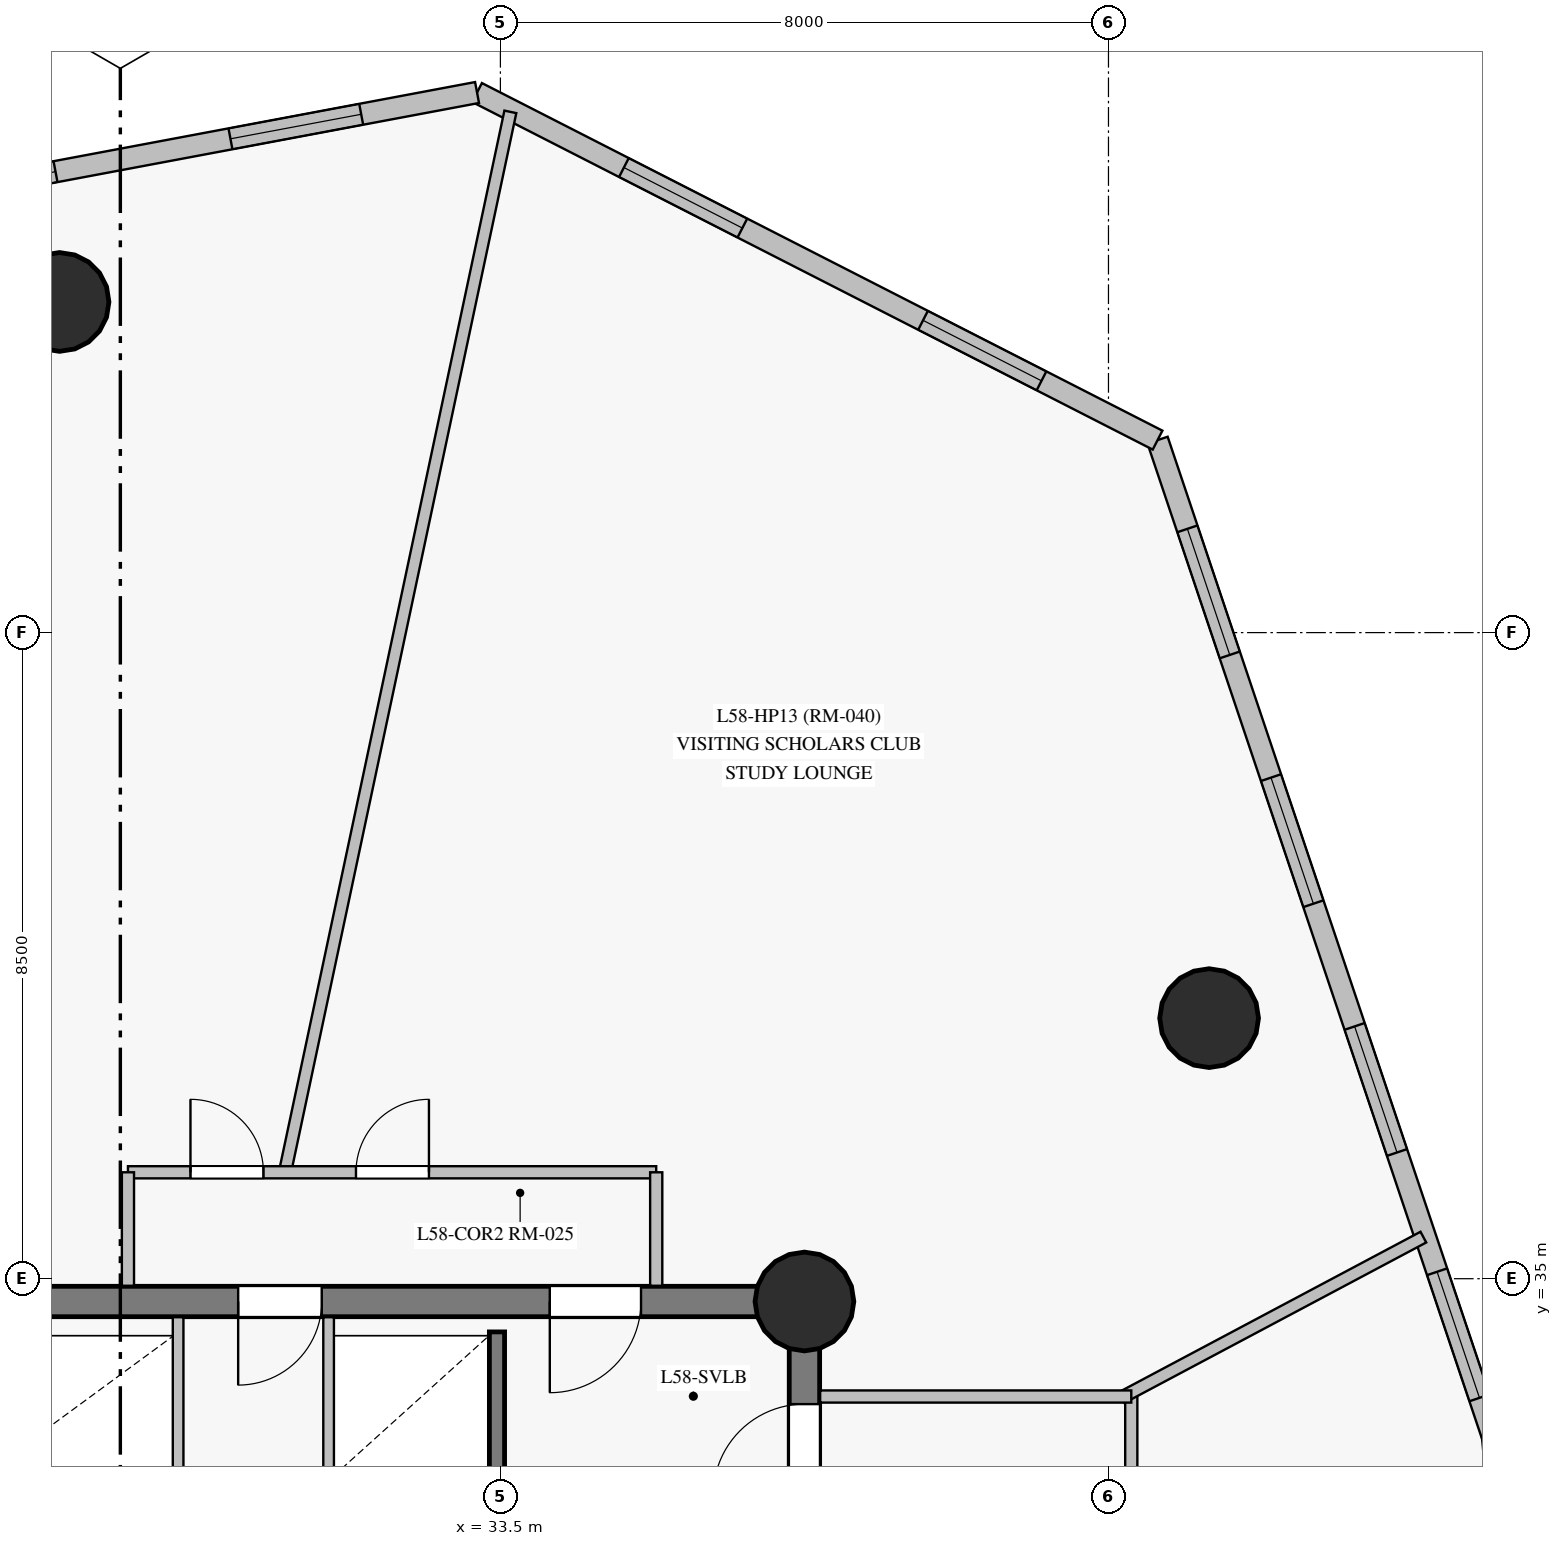
"""IFC4 building model, lengths in metres.
Left out: names, types, materials, properties, quantities, classifications, styles, units other than length and angle.
Written with IfcOpenShell. Run it as: python <this file> out.ifc"""

import sys

from ifc_helpers import new_model, si_unit, direction, frame, frame_2d, origin, origin_with_axes, origin_2d, place, context, subcontext, project, spatial, rectangle, circle, extrude, source, transform, mapped, element, fill, save


model = new_model("IFC4")
c1 = context("Model", 3, precision=1e-05, world=origin(), true_north=direction((0.0, 1.0)))
c2 = subcontext(c1, "Body", "Model", "MODEL_VIEW")
j1 = project(units=[si_unit("LENGTHUNIT", "METRE"), si_unit("PLANEANGLEUNIT", "RADIAN")], contexts=[c1])
p1 = place(None, origin())
s1 = spatial("IfcSite", under=j1, at=p1, CompositionType="ELEMENT")
p2 = place(p1, origin())
s2 = spatial("IfcBuilding", under=s1, at=p2, CompositionType="ELEMENT")
p3 = place(p2, frame((0.0, 0.0, 199.25)))
s3 = spatial("IfcBuildingStorey", under=s2, at=p3, CompositionType="ELEMENT", Elevation=199.25)
p4 = place(p3, frame((37.5, 18.3, 0.0), z_axis=(0.0, 0.0, 1.0), x_axis=(0.0, 1.0, 0.0)))
e1 = element("IfcWall", 1, at=p4, inside=s3, PredefinedType="SHEAR", context=c2, shape_type="SweptSolid", body=[
    extrude(rectangle(XDim=16.4, YDim=0.4, at=frame_2d((8.2, 0.0))), origin(), (0.0, 0.0, 1.0), 2.825),
])
p5 = place(p4, frame((13.85, 0.0, 0.0)))
e2 = element("IfcOpeningElement", 2, at=p5, cuts=e1, PredefinedType="OPENING", context=c2, shape_type="SweptSolid", body=[
    extrude(rectangle(XDim=1.2, YDim=2.15, at=frame_2d((0.6, 1.075))), frame((0.0, 0.21, 0.0), z_axis=(0.0, -1.0, 0.0), x_axis=(1.0, 0.0, 0.0)), (0.0, 0.0, 1.0), 0.42),
])
p6 = place(p3, frame((37.5, 34.7, 0.0), z_axis=(0.0, 0.0, 1.0), x_axis=(-1.0, 0.0, 0.0)))
e3 = element("IfcWall", 3, at=p6, inside=s3, PredefinedType="SHEAR", context=c2, shape_type="SweptSolid", body=[
    extrude(rectangle(XDim=10.95, YDim=0.4, at=frame_2d((5.475, 0.0))), origin(), (0.0, 0.0, 1.0), 2.825),
])
p7 = place(p6, frame((2.15, 0.0, 0.0)))
e4 = element("IfcOpeningElement", 4, at=p7, cuts=e3, PredefinedType="OPENING", context=c2, shape_type="SweptSolid", body=[
    extrude(rectangle(XDim=1.2, YDim=2.15, at=frame_2d((0.6, 1.075))), frame((0.0, 0.21, 0.0), z_axis=(0.0, -1.0, 0.0), x_axis=(1.0, 0.0, 0.0)), (0.0, 0.0, 1.0), 0.42),
])
p8 = place(p6, frame((6.35, 0.0, 0.0)))
e5 = element("IfcOpeningElement", 5, at=p8, cuts=e3, PredefinedType="OPENING", context=c2, shape_type="SweptSolid", body=[
    extrude(rectangle(XDim=1.1, YDim=2.15, at=frame_2d((0.55, 1.075))), frame((0.0, 0.21, 0.0), z_axis=(0.0, -1.0, 0.0), x_axis=(1.0, 0.0, 0.0)), (0.0, 0.0, 1.0), 0.42),
])
m1 = source(origin_with_axes(), c2, "Body", "SweptSolid", [
    extrude(circle(Radius=0.65, at=origin_2d()), origin(), (0.0, 0.0, 1.0), 3.05),
])
for number, where, z_axis, x_axis in (
    (6, (37.5, 34.7, 0.0), (0.0, 0.0, 1.0), (1.0, 0.0, 0.0)),
    (7, (42.824, 38.428, 0.0), (0.0, 0.0, 1.0), (1.0, 0.0, 0.0)),
    (8, (27.7, 47.85, 0.0), (0.0, 0.0, 1.0), (1.0, 0.0, 0.0)),
):
    element("IfcColumn", number, at=place(p3, frame(where, z_axis=z_axis, x_axis=x_axis)), inside=s3, PredefinedType="COLUMN", context=c2, shape_type="MappedRepresentation", body=[
        mapped(m1, transform((0.0, 0.0, 0.0), scale=1.0)),
    ])
p9 = place(p3, frame((46.554, 32.917, 0.0), z_axis=(0.0, 0.0, 1.0), x_axis=(-0.318603463381, 0.947888091033, 0.0)))
e9 = element("IfcWall", 9, at=p9, inside=s3, PredefinedType="SOLIDWALL", context=c2, shape_type="SweptSolid", body=[
    extrude(rectangle(XDim=13.837, YDim=0.28, at=frame_2d((6.918, 0.0))), origin(), (0.0, 0.0, 1.0), 2.825),
])
p10 = place(p9, frame((0.544, 0.0, 0.85)))
e10 = element("IfcOpeningElement", 10, at=p10, cuts=e9, PredefinedType="OPENING", context=c2, shape_type="SweptSolid", body=[
    extrude(rectangle(XDim=1.75, YDim=1.65, at=frame_2d((0.875, 0.825))), frame((0.0, 0.15, 0.0), z_axis=(0.0, -1.0, 0.0), x_axis=(1.0, 0.0, 0.0)), (0.0, 0.0, 1.0), 0.3),
])
p11 = place(p9, frame((3.949, 0.0, 0.85)))
e11 = element("IfcOpeningElement", 11, at=p11, cuts=e9, PredefinedType="OPENING", context=c2, shape_type="SweptSolid", body=[
    extrude(rectangle(XDim=1.75, YDim=1.65, at=frame_2d((0.875, 0.825))), frame((0.0, 0.15, 0.0), z_axis=(0.0, -1.0, 0.0), x_axis=(1.0, 0.0, 0.0)), (0.0, 0.0, 1.0), 0.3),
])
p12 = place(p9, frame((7.402, 0.0, 0.85)))
e12 = element("IfcOpeningElement", 12, at=p12, cuts=e9, PredefinedType="OPENING", context=c2, shape_type="SweptSolid", body=[
    extrude(rectangle(XDim=1.75, YDim=1.65, at=frame_2d((0.875, 0.825))), frame((0.0, 0.15, 0.0), z_axis=(0.0, -1.0, 0.0), x_axis=(1.0, 0.0, 0.0)), (0.0, 0.0, 1.0), 0.3),
])
p13 = place(p9, frame((10.855, 0.0, 0.85)))
e13 = element("IfcOpeningElement", 13, at=p13, cuts=e9, PredefinedType="OPENING", context=c2, shape_type="SweptSolid", body=[
    extrude(rectangle(XDim=1.75, YDim=1.65, at=frame_2d((0.875, 0.825))), frame((0.0, 0.15, 0.0), z_axis=(0.0, -1.0, 0.0), x_axis=(1.0, 0.0, 0.0)), (0.0, 0.0, 1.0), 0.3),
])
p14 = place(p3, frame((42.146, 46.032, 0.0), z_axis=(0.0, 0.0, 1.0), x_axis=(-0.890552311642, 0.454880841792, 0.0)))
e14 = element("IfcWall", 14, at=p14, inside=s3, PredefinedType="SOLIDWALL", context=c2, shape_type="SweptSolid", body=[
    extrude(rectangle(XDim=10.053, YDim=0.28, at=frame_2d((5.027, 0.0))), origin(), (0.0, 0.0, 1.0), 2.825),
])
p15 = place(p14, frame((1.715, 0.0, 0.85)))
e15 = element("IfcOpeningElement", 15, at=p15, cuts=e14, PredefinedType="OPENING", context=c2, shape_type="SweptSolid", body=[
    extrude(rectangle(XDim=1.75, YDim=1.65, at=frame_2d((0.875, 0.825))), frame((0.0, 0.15, 0.0), z_axis=(0.0, -1.0, 0.0), x_axis=(1.0, 0.0, 0.0)), (0.0, 0.0, 1.0), 0.3),
])
p16 = place(p14, frame((6.134, 0.0, 0.85)))
e16 = element("IfcOpeningElement", 16, at=p16, cuts=e14, PredefinedType="OPENING", context=c2, shape_type="SweptSolid", body=[
    extrude(rectangle(XDim=1.75, YDim=1.65, at=frame_2d((0.875, 0.825))), frame((0.0, 0.15, 0.0), z_axis=(0.0, -1.0, 0.0), x_axis=(1.0, 0.0, 0.0)), (0.0, 0.0, 1.0), 0.3),
])
p17 = place(p3, frame((33.193, 50.605, 0.0), z_axis=(0.0, 0.0, 1.0), x_axis=(-0.982828906214, -0.184519216099, 0.0)))
e17 = element("IfcWall", 17, at=p17, inside=s3, PredefinedType="SOLIDWALL", context=c2, shape_type="SweptSolid", body=[
    extrude(rectangle(XDim=13.035, YDim=0.28, at=frame_2d((6.518, 0.0))), origin(), (0.0, 0.0, 1.0), 2.825),
])
p18 = place(p17, frame((1.551, 0.0, 0.85)))
e18 = element("IfcOpeningElement", 18, at=p18, cuts=e17, PredefinedType="OPENING", context=c2, shape_type="SweptSolid", body=[
    extrude(rectangle(XDim=1.75, YDim=1.65, at=frame_2d((0.875, 0.825))), frame((0.0, 0.15, 0.0), z_axis=(0.0, -1.0, 0.0), x_axis=(1.0, 0.0, 0.0)), (0.0, 0.0, 1.0), 0.3),
])
p19 = place(p17, frame((5.643, 0.0, 0.85)))
e19 = element("IfcOpeningElement", 19, at=p19, cuts=e17, PredefinedType="OPENING", context=c2, shape_type="SweptSolid", body=[
    extrude(rectangle(XDim=1.75, YDim=1.65, at=frame_2d((0.875, 0.825))), frame((0.0, 0.15, 0.0), z_axis=(0.0, -1.0, 0.0), x_axis=(1.0, 0.0, 0.0)), (0.0, 0.0, 1.0), 0.3),
])
p20 = place(p17, frame((9.735, 0.0, 0.85)))
e20 = element("IfcOpeningElement", 20, at=p20, cuts=e17, PredefinedType="OPENING", context=c2, shape_type="SweptSolid", body=[
    extrude(rectangle(XDim=1.75, YDim=1.65, at=frame_2d((0.875, 0.825))), frame((0.0, 0.15, 0.0), z_axis=(0.0, -1.0, 0.0), x_axis=(1.0, 0.0, 0.0)), (0.0, 0.0, 1.0), 0.3),
])
p21 = place(p3, frame((33.455, 18.7, 0.0), z_axis=(0.0, 0.0, 1.0), x_axis=(0.0, 1.0, 0.0)))
e21 = element("IfcWall", 21, at=p21, inside=s3, PredefinedType="SHEAR", context=c2, shape_type="SweptSolid", body=[
    extrude(rectangle(XDim=15.6, YDim=0.2, at=frame_2d((7.8, 0.0))), origin(), (0.0, 0.0, 1.0), 2.825),
])
p22 = place(p21, frame((2.75, 0.0, 0.0)))
e22 = element("IfcOpeningElement", 22, at=p22, cuts=e21, PredefinedType="OPENING", context=c2, shape_type="SweptSolid", body=[
    extrude(rectangle(XDim=1.15, YDim=2.15, at=frame_2d((0.575, 1.075))), frame((0.0, 0.11, 0.0), z_axis=(0.0, -1.0, 0.0), x_axis=(1.0, 0.0, 0.0)), (0.0, 0.0, 1.0), 0.22),
])
p23 = place(p21, frame((0.55, 0.0, 0.0)))
e23 = element("IfcOpeningElement", 23, at=p23, cuts=e21, PredefinedType="OPENING", context=c2, shape_type="SweptSolid", body=[
    extrude(rectangle(XDim=0.94, YDim=2.1, at=frame_2d((0.47, 1.05))), frame((0.0, 0.11, 0.0), z_axis=(0.0, -1.0, 0.0), x_axis=(1.0, 0.0, 0.0)), (0.0, 0.0, 1.0), 0.22),
])
p24 = place(p3, frame((41.8, 33.45, 0.0), z_axis=(0.0, 0.0, 1.0), x_axis=(0.0, -1.0, 0.0)))
e24 = element("IfcWall", 24, at=p24, inside=s3, PredefinedType="PARTITIONING", context=c2, shape_type="SweptSolid", body=[
    extrude(rectangle(XDim=19.6, YDim=0.16, at=frame_2d((9.8, 0.0))), origin(), (0.0, 0.0, 1.0), 2.275),
])
p25 = place(p24, frame((10.475, 0.0, 0.0)))
e25 = element("IfcOpeningElement", 25, at=p25, cuts=e24, PredefinedType="OPENING", context=c2, shape_type="SweptSolid", body=[
    extrude(rectangle(XDim=0.96, YDim=2.15, at=frame_2d((0.48, 1.075))), frame((0.0, 0.09, 0.0), z_axis=(0.0, -1.0, 0.0), x_axis=(1.0, 0.0, 0.0)), (0.0, 0.0, 1.0), 0.18),
])
p26 = place(p24, frame((9.325, 0.0, 0.0)))
e26 = element("IfcOpeningElement", 26, at=p26, cuts=e24, PredefinedType="OPENING", context=c2, shape_type="SweptSolid", body=[
    extrude(rectangle(XDim=0.96, YDim=2.15, at=frame_2d((0.48, 1.075))), frame((0.0, 0.09, 0.0), z_axis=(0.0, -1.0, 0.0), x_axis=(1.0, 0.0, 0.0)), (0.0, 0.0, 1.0), 0.18),
])
p27 = place(p24, frame((4.425, 0.0, 0.0)))
e27 = element("IfcOpeningElement", 27, at=p27, cuts=e24, PredefinedType="OPENING", context=c2, shape_type="SweptSolid", body=[
    extrude(rectangle(XDim=0.96, YDim=2.15, at=frame_2d((0.48, 1.075))), frame((0.0, 0.09, 0.0), z_axis=(0.0, -1.0, 0.0), x_axis=(1.0, 0.0, 0.0)), (0.0, 0.0, 1.0), 0.18),
])
p28 = place(p3, frame((30.659, 36.371, 0.0), z_axis=(0.0, 0.0, 1.0), x_axis=(0.207917796802, 0.978146302847, 0.0)))
e28 = element("IfcWall", 28, at=p28, inside=s3, PredefinedType="PARTITIONING", context=c2, shape_type="SweptSolid", body=[
    extrude(rectangle(XDim=14.292, YDim=0.16, at=frame_2d((7.146, 0.0))), origin(), (0.0, 0.0, 1.0), 2.825),
])
p29 = place(p3, frame((28.6, 36.4, 0.0), z_axis=(0.0, 0.0, 1.0), x_axis=(1.0, 0.0, 0.0)))
e29 = element("IfcWall", 29, at=p29, inside=s3, PredefinedType="PARTITIONING", context=c2, shape_type="SweptSolid", body=[
    extrude(rectangle(XDim=6.95, YDim=0.16, at=frame_2d((3.475, 0.0))), origin(), (0.0, 0.0, 1.0), 2.375),
])
p30 = place(p29, frame((3.0, 0.0, 0.0)))
e30 = element("IfcOpeningElement", 30, at=p30, cuts=e29, PredefinedType="OPENING", context=c2, shape_type="SweptSolid", body=[
    extrude(rectangle(XDim=0.96, YDim=2.15, at=frame_2d((0.48, 1.075))), frame((0.0, 0.09, 0.0), z_axis=(0.0, -1.0, 0.0), x_axis=(1.0, 0.0, 0.0)), (0.0, 0.0, 1.0), 0.18),
])
p31 = place(p29, frame((0.823, 0.0, 0.0)))
e31 = element("IfcOpeningElement", 31, at=p31, cuts=e29, PredefinedType="OPENING", context=c2, shape_type="SweptSolid", body=[
    extrude(rectangle(XDim=0.96, YDim=2.15, at=frame_2d((0.48, 1.075))), frame((0.0, 0.09, 0.0), z_axis=(0.0, -1.0, 0.0), x_axis=(1.0, 0.0, 0.0)), (0.0, 0.0, 1.0), 0.18),
])
p32 = place(p3, frame((41.672, 33.436, 0.0), z_axis=(0.0, 0.0, 1.0), x_axis=(0.882929374505, 0.469505824923, 0.0)))
e32 = element("IfcWall", 32, at=p32, inside=s3, PredefinedType="PARTITIONING", context=c2, shape_type="SweptSolid", body=[
    extrude(rectangle(XDim=4.497, YDim=0.16, at=frame_2d((2.249, 0.0))), origin(), (0.0, 0.0, 1.0), 2.825),
])
p33 = place(p3, frame((37.707, 33.45, 0.0), z_axis=(0.0, 0.0, 1.0), x_axis=(1.0, 0.0, 0.0)))
e33 = element("IfcWall", 33, at=p33, inside=s3, PredefinedType="PARTITIONING", context=c2, shape_type="SweptSolid", body=[
    extrude(rectangle(XDim=4.093, YDim=0.16, at=frame_2d((2.046, 0.0))), origin(), (0.0, 0.0, 1.0), 2.825),
])
for number, where, z_axis, x_axis in (
    (34, (29.26, 30.45, 0.0), (0.0, 0.0, 1.0), (0.0, 1.0, 0.0)),
    (35, (31.24, 30.45, 0.0), (0.0, 0.0, 1.0), (0.0, 1.0, 0.0)),
):
    element("IfcWall", number, at=place(p3, frame(where, z_axis=z_axis, x_axis=x_axis)), inside=s3, PredefinedType="PARTITIONING", context=c2, shape_type="SweptSolid", body=[
        extrude(rectangle(XDim=4.043, YDim=0.14, at=frame_2d((2.021, 0.0))), origin(), (0.0, 0.0, 1.0), 2.825),
    ])
for number, where, z_axis, x_axis in (
    (36, (28.6, 34.907, 0.0), (0.0, 0.0, 1.0), (0.0, 1.0, 0.0)),
    (37, (35.55, 36.4, 0.0), (0.0, 0.0, 1.0), (0.0, -1.0, 0.0)),
):
    element("IfcWall", number, at=place(p3, frame(where, z_axis=z_axis, x_axis=x_axis)), inside=s3, PredefinedType="PARTITIONING", context=c2, shape_type="SweptSolid", body=[
        extrude(rectangle(XDim=1.493, YDim=0.16, at=frame_2d((0.747, 0.0))), origin(), (0.0, 0.0, 1.0), 2.825),
    ])
m2 = source(origin_with_axes(), c2, "Body", "SweptSolid", [
    extrude(rectangle(XDim=1.75, YDim=1.65, at=frame_2d((0.875, 0.825))), frame((0.0, 0.03, 0.0), z_axis=(0.0, -1.0, 0.0), x_axis=(1.0, 0.0, 0.0)), (0.0, 0.0, 1.0), 0.06),
])
p34 = place(p10, origin())
e38 = element("IfcWindow", 38, at=p34, inside=s3, PartitioningType="SINGLE_PANEL", PredefinedType="WINDOW", context=c2, shape_type="MappedRepresentation", body=[
    mapped(m2, transform((0.0, 0.0, 0.0), scale=1.0)),
])
fill(e10, e38)
p35 = place(p11, origin())
e39 = element("IfcWindow", 39, at=p35, inside=s3, PartitioningType="SINGLE_PANEL", PredefinedType="WINDOW", context=c2, shape_type="MappedRepresentation", body=[
    mapped(m2, transform((0.0, 0.0, 0.0), scale=1.0)),
])
fill(e11, e39)
p36 = place(p12, origin())
e40 = element("IfcWindow", 40, at=p36, inside=s3, PartitioningType="SINGLE_PANEL", PredefinedType="WINDOW", context=c2, shape_type="MappedRepresentation", body=[
    mapped(m2, transform((0.0, 0.0, 0.0), scale=1.0)),
])
fill(e12, e40)
p37 = place(p13, origin())
e41 = element("IfcWindow", 41, at=p37, inside=s3, PartitioningType="SINGLE_PANEL", PredefinedType="WINDOW", context=c2, shape_type="MappedRepresentation", body=[
    mapped(m2, transform((0.0, 0.0, 0.0), scale=1.0)),
])
fill(e13, e41)
p38 = place(p15, origin())
e42 = element("IfcWindow", 42, at=p38, inside=s3, PartitioningType="SINGLE_PANEL", PredefinedType="WINDOW", context=c2, shape_type="MappedRepresentation", body=[
    mapped(m2, transform((0.0, 0.0, 0.0), scale=1.0)),
])
fill(e15, e42)
p39 = place(p16, origin())
e43 = element("IfcWindow", 43, at=p39, inside=s3, PartitioningType="SINGLE_PANEL", PredefinedType="WINDOW", context=c2, shape_type="MappedRepresentation", body=[
    mapped(m2, transform((0.0, 0.0, 0.0), scale=1.0)),
])
fill(e16, e43)
p40 = place(p18, origin())
e44 = element("IfcWindow", 44, at=p40, inside=s3, PartitioningType="SINGLE_PANEL", PredefinedType="WINDOW", context=c2, shape_type="MappedRepresentation", body=[
    mapped(m2, transform((0.0, 0.0, 0.0), scale=1.0)),
])
fill(e18, e44)
p41 = place(p19, origin())
e45 = element("IfcWindow", 45, at=p41, inside=s3, PartitioningType="SINGLE_PANEL", PredefinedType="WINDOW", context=c2, shape_type="MappedRepresentation", body=[
    mapped(m2, transform((0.0, 0.0, 0.0), scale=1.0)),
])
fill(e19, e45)
m3 = source(origin_with_axes(), c2, "Body", "SweptSolid", [
    extrude(rectangle(XDim=1.2, YDim=2.15, at=frame_2d((0.6, 1.075))), frame((0.0, 0.025, 0.0), z_axis=(0.0, -1.0, 0.0), x_axis=(1.0, 0.0, 0.0)), (0.0, 0.0, 1.0), 0.05),
])
p42 = place(p5, origin())
e46 = element("IfcDoor", 46, at=p42, inside=s3, OperationType="SINGLE_SWING_LEFT", PredefinedType="DOOR", context=c2, shape_type="MappedRepresentation", body=[
    mapped(m3, transform((0.0, 0.0, 0.0), scale=1.0)),
])
fill(e2, e46)
p43 = place(p7, origin())
e47 = element("IfcDoor", 47, at=p43, inside=s3, OperationType="SINGLE_SWING_RIGHT", PredefinedType="DOOR", context=c2, shape_type="MappedRepresentation", body=[
    mapped(m3, transform((0.0, 0.0, 0.0), scale=1.0)),
])
fill(e4, e47)
m4 = source(origin_with_axes(), c2, "Body", "SweptSolid", [
    extrude(rectangle(XDim=1.1, YDim=2.15, at=frame_2d((0.55, 1.075))), frame((0.0, 0.025, 0.0), z_axis=(0.0, -1.0, 0.0), x_axis=(1.0, 0.0, 0.0)), (0.0, 0.0, 1.0), 0.05),
])
p44 = place(p8, origin())
e48 = element("IfcDoor", 48, at=p44, inside=s3, OperationType="SINGLE_SWING_RIGHT", PredefinedType="DOOR", context=c2, shape_type="MappedRepresentation", body=[
    mapped(m4, transform((0.0, 0.0, 0.0), scale=1.0)),
])
fill(e5, e48)
m5 = source(origin_with_axes(), c2, "Body", "SweptSolid", [
    extrude(rectangle(XDim=0.96, YDim=2.15, at=frame_2d((0.48, 1.075))), frame((0.0, 0.025, 0.0), z_axis=(0.0, -1.0, 0.0), x_axis=(1.0, 0.0, 0.0)), (0.0, 0.0, 1.0), 0.05),
])
p45 = place(p30, origin())
e49 = element("IfcDoor", 49, at=p45, inside=s3, OperationType="SINGLE_SWING_RIGHT", PredefinedType="DOOR", context=c2, shape_type="MappedRepresentation", body=[
    mapped(m5, transform((0.0, 0.0, 0.0), scale=1.0)),
])
fill(e30, e49)
p46 = place(p31, origin())
e50 = element("IfcDoor", 50, at=p46, inside=s3, OperationType="SINGLE_SWING_LEFT", PredefinedType="DOOR", context=c2, shape_type="MappedRepresentation", body=[
    mapped(m5, transform((0.0, 0.0, 0.0), scale=1.0)),
])
fill(e31, e50)
save(model, sys.argv[1])
